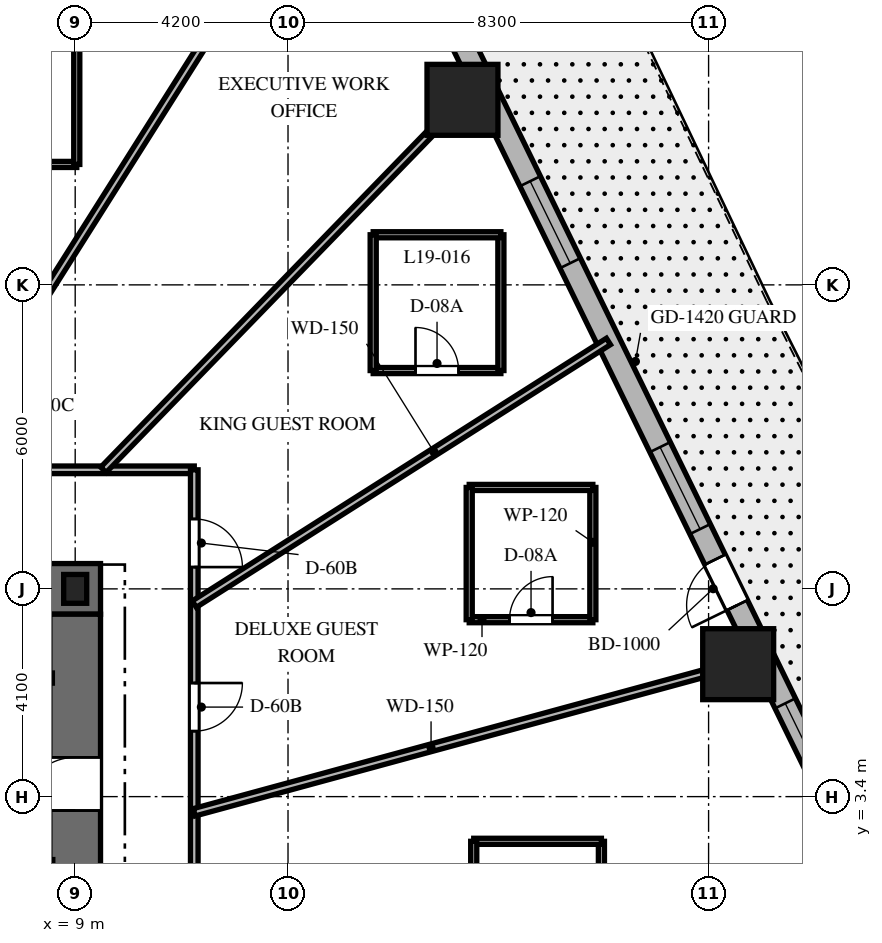
"""IFC4 building model, lengths in metres.
Left out: names, types, materials, properties, quantities, classifications, styles, units other than length and angle.
Written with IfcOpenShell. Run it as: python <this file> out.ifc"""

import sys

from ifc_helpers import new_model, si_unit, direction, frame, frame_2d, origin, origin_2d, place, context, subcontext, project, spatial, rectangle, i_section, extrude, element, fill, save


model = new_model("IFC4")
c1 = context("Model", 3, precision=1e-05, world=origin(), true_north=direction((0.0, 1.0)))
c2 = subcontext(c1, "Body", "Model", "MODEL_VIEW")
j1 = project(units=[si_unit("LENGTHUNIT", "METRE"), si_unit("PLANEANGLEUNIT", "RADIAN")], contexts=[c1])
p1 = place(None, origin())
s1 = spatial("IfcSite", under=j1, at=p1, CompositionType="ELEMENT")
p2 = place(p1, origin())
s2 = spatial("IfcBuilding", under=s1, at=p2, CompositionType="ELEMENT")
p3 = place(p2, frame((0.0, 0.0, 82.3)))
s3 = spatial("IfcBuildingStorey", under=s2, at=p3, CompositionType="ELEMENT", Elevation=82.3)
p4 = place(p3, frame((1.85, 7.5, 0.0), z_axis=(0.0, 0.0, 1.0), x_axis=(1.0, 0.0, 0.0)))
e1 = element("IfcWall", 1, at=p4, inside=s3, PredefinedType="SHEAR", context=c2, shape_type="SweptSolid", body=[
    extrude(rectangle(XDim=7.65, YDim=1.0, at=frame_2d((3.825, 0.0))), origin(), (0.0, 0.0, 1.0), 3.7),
])
p5 = place(p3, frame((9.0, -7.0, 0.0), z_axis=(0.0, 0.0, 1.0), x_axis=(0.0, 1.0, 0.0)))
e2 = element("IfcWall", 2, at=p5, inside=s3, PredefinedType="SHEAR", context=c2, shape_type="SweptSolid", body=[
    extrude(rectangle(XDim=14.0, YDim=1.0, at=frame_2d((7.0, 0.0))), origin(), (0.0, 0.0, 1.0), 3.7),
])
p6 = place(p5, frame((10.125, 0.0, 0.0)))
e3 = element("IfcOpeningElement", 3, at=p6, cuts=e2, PredefinedType="OPENING", context=c2, shape_type="SweptSolid", body=[
    extrude(rectangle(XDim=1.05, YDim=2.15, at=frame_2d((0.525, 1.075))), frame((0.0, 0.51, 0.0), z_axis=(0.0, -1.0, 0.0), x_axis=(1.0, 0.0, 0.0)), (0.0, 0.0, 1.0), 1.02),
])
p7 = place(p3, frame((8.458, -6.985, 0.0), z_axis=(0.0, 0.0, 1.0), x_axis=(0.0, 1.0, 0.0)))
e4 = element("IfcWall", 4, at=p7, inside=s3, PredefinedType="SHEAR", context=c2, shape_type="SweptSolid", body=[
    extrude(rectangle(XDim=9.143, YDim=0.2, at=frame_2d((4.572, 0.0))), origin(), (0.0, 0.0, 1.0), 3.7),
])
p8 = place(p3, frame((9.0, 7.5, 0.0), z_axis=(0.0, 0.0, 1.0), x_axis=(1.0, 0.0, 0.0)))
e5 = element("IfcColumn", 5, at=p8, inside=s3, PredefinedType="COLUMN", context=c2, shape_type="SweptSolid", body=[
    extrude(i_section(OverallWidth=0.454, OverallDepth=0.569, WebThickness=0.078, FlangeThickness=0.125, at=origin_2d()), origin(), (0.0, 0.0, 1.0), 3.7),
])
for number, where, z_axis, x_axis in (
    (6, (22.084, 6.014, 0.0), (0.0, 0.0, 1.0), (1.0, 0.0, 0.0)),
    (7, (16.643, 17.152, 0.0), (0.0, 0.0, 1.0), (1.0, 0.0, 0.0)),
):
    element("IfcColumn", number, at=place(p3, frame(where, z_axis=z_axis, x_axis=x_axis)), inside=s3, PredefinedType="COLUMN", context=c2, shape_type="SweptSolid", body=[
        extrude(rectangle(XDim=1.4, YDim=1.4, at=origin_2d()), origin(), (0.0, 0.0, 1.0), 3.7),
    ])
p9 = place(p3, frame((24.336, 2.532, 0.0), z_axis=(0.0, 0.0, 1.0), x_axis=(-0.438931326393, 0.898520612291, 0.0)))
e8 = element("IfcWall", 8, at=p9, inside=s3, PredefinedType="SOLIDWALL", context=c2, shape_type="SweptSolid", body=[
    extrude(rectangle(XDim=20.623, YDim=0.45, at=frame_2d((10.312, 0.0))), origin(), (0.0, 0.0, 1.0), 3.38),
])
p10 = place(p9, frame((5.171, 0.0, 0.0)))
e9 = element("IfcOpeningElement", 9, at=p10, cuts=e8, PredefinedType="OPENING", context=c2, shape_type="SweptSolid", body=[
    extrude(rectangle(XDim=1.0, YDim=2.15, at=frame_2d((0.5, 1.075))), frame((0.0, 0.235, 0.0), z_axis=(0.0, -1.0, 0.0), x_axis=(1.0, 0.0, 0.0)), (0.0, 0.0, 1.0), 0.47),
])
p11 = place(p9, frame((6.842, 0.0, 0.8)))
e10 = element("IfcOpeningElement", 10, at=p11, cuts=e8, PredefinedType="OPENING", context=c2, shape_type="SweptSolid", body=[
    extrude(rectangle(XDim=1.8, YDim=1.8, at=frame_2d((0.9, 0.9))), frame((0.0, 0.235, 0.0), z_axis=(0.0, -1.0, 0.0), x_axis=(1.0, 0.0, 0.0)), (0.0, 0.0, 1.0), 0.47),
])
p12 = place(p9, frame((12.683, 0.0, 0.8)))
e11 = element("IfcOpeningElement", 11, at=p12, cuts=e8, PredefinedType="OPENING", context=c2, shape_type="SweptSolid", body=[
    extrude(rectangle(XDim=1.8, YDim=1.8, at=frame_2d((0.9, 0.9))), frame((0.0, 0.235, 0.0), z_axis=(0.0, -1.0, 0.0), x_axis=(1.0, 0.0, 0.0)), (0.0, 0.0, 1.0), 0.47),
])
p13 = place(p9, frame((17.66, 0.0, 0.8)))
e12 = element("IfcOpeningElement", 12, at=p13, cuts=e8, PredefinedType="OPENING", context=c2, shape_type="SweptSolid", body=[
    extrude(rectangle(XDim=1.8, YDim=1.8, at=frame_2d((0.9, 0.9))), frame((0.0, 0.235, 0.0), z_axis=(0.0, -1.0, 0.0), x_axis=(1.0, 0.0, 0.0)), (0.0, 0.0, 1.0), 0.47),
])
p14 = place(p9, frame((1.214, 0.0, 0.8)))
e13 = element("IfcOpeningElement", 13, at=p14, cuts=e8, PredefinedType="OPENING", context=c2, shape_type="SweptSolid", body=[
    extrude(rectangle(XDim=1.8, YDim=1.8, at=frame_2d((0.9, 0.9))), frame((0.0, 0.235, 0.0), z_axis=(0.0, -1.0, 0.0), x_axis=(1.0, 0.0, 0.0)), (0.0, 0.0, 1.0), 0.47),
])
p15 = place(p3, frame((-11.35, 9.85, 0.0), z_axis=(0.0, 0.0, 1.0), x_axis=(1.0, 0.0, 0.0)))
e14 = element("IfcWall", 14, at=p15, inside=s3, PredefinedType="PARTITIONING", context=c2, shape_type="SweptSolid", body=[
    extrude(rectangle(XDim=22.7, YDim=0.15, at=frame_2d((11.35, 0.0))), origin(), (0.0, 0.0, 1.0), 2.82),
])
p16 = place(p15, frame((18.837, 0.0, 0.0)))
e15 = element("IfcOpeningElement", 15, at=p16, cuts=e14, PredefinedType="OPENING", context=c2, shape_type="SweptSolid", body=[
    extrude(rectangle(XDim=0.9, YDim=2.03, at=frame_2d((0.45, 1.015))), frame((0.0, 0.085, 0.0), z_axis=(0.0, -1.0, 0.0), x_axis=(1.0, 0.0, 0.0)), (0.0, 0.0, 1.0), 0.17),
])
p17 = place(p15, frame((15.532, 0.0, 0.0)))
e16 = element("IfcOpeningElement", 16, at=p17, cuts=e14, PredefinedType="OPENING", context=c2, shape_type="SweptSolid", body=[
    extrude(rectangle(XDim=0.95, YDim=2.03, at=frame_2d((0.475, 1.015))), frame((0.0, 0.085, 0.0), z_axis=(0.0, -1.0, 0.0), x_axis=(1.0, 0.0, 0.0)), (0.0, 0.0, 1.0), 0.17),
])
p18 = place(p15, frame((10.444, 0.0, 0.0)))
e17 = element("IfcOpeningElement", 17, at=p18, cuts=e14, PredefinedType="OPENING", context=c2, shape_type="SweptSolid", body=[
    extrude(rectangle(XDim=0.95, YDim=2.03, at=frame_2d((0.475, 1.015))), frame((0.0, 0.085, 0.0), z_axis=(0.0, -1.0, 0.0), x_axis=(1.0, 0.0, 0.0)), (0.0, 0.0, 1.0), 0.17),
])
p19 = place(p15, frame((3.369, 0.0, 0.0)))
e18 = element("IfcOpeningElement", 18, at=p19, cuts=e14, PredefinedType="OPENING", context=c2, shape_type="SweptSolid", body=[
    extrude(rectangle(XDim=0.95, YDim=2.03, at=frame_2d((0.475, 1.015))), frame((0.0, 0.085, 0.0), z_axis=(0.0, -1.0, 0.0), x_axis=(1.0, 0.0, 0.0)), (0.0, 0.0, 1.0), 0.17),
])
p20 = place(p3, frame((11.35, 9.85, 0.0), z_axis=(0.0, 0.0, 1.0), x_axis=(0.0, -1.0, 0.0)))
e19 = element("IfcWall", 19, at=p20, inside=s3, PredefinedType="PARTITIONING", context=c2, shape_type="SweptSolid", body=[
    extrude(rectangle(XDim=19.7, YDim=0.15, at=frame_2d((9.85, 0.0))), origin(), (0.0, 0.0, 1.0), 2.82),
])
p21 = place(p20, frame((4.208, 0.0, 0.0)))
e20 = element("IfcOpeningElement", 20, at=p21, cuts=e19, PredefinedType="OPENING", context=c2, shape_type="SweptSolid", body=[
    extrude(rectangle(XDim=0.95, YDim=2.03, at=frame_2d((0.475, 1.015))), frame((0.0, 0.085, 0.0), z_axis=(0.0, -1.0, 0.0), x_axis=(1.0, 0.0, 0.0)), (0.0, 0.0, 1.0), 0.17),
])
p22 = place(p20, frame((0.97, 0.0, 0.0)))
e21 = element("IfcOpeningElement", 21, at=p22, cuts=e19, PredefinedType="OPENING", context=c2, shape_type="SweptSolid", body=[
    extrude(rectangle(XDim=0.95, YDim=2.03, at=frame_2d((0.475, 1.015))), frame((0.0, 0.085, 0.0), z_axis=(0.0, -1.0, 0.0), x_axis=(1.0, 0.0, 0.0)), (0.0, 0.0, 1.0), 0.17),
])
p23 = place(p20, frame((17.181, 0.0, 0.0)))
e22 = element("IfcOpeningElement", 22, at=p23, cuts=e19, PredefinedType="OPENING", context=c2, shape_type="SweptSolid", body=[
    extrude(rectangle(XDim=0.95, YDim=2.03, at=frame_2d((0.475, 1.015))), frame((0.0, 0.085, 0.0), z_axis=(0.0, -1.0, 0.0), x_axis=(1.0, 0.0, 0.0)), (0.0, 0.0, 1.0), 0.17),
])
p24 = place(p20, frame((13.403, 0.0, 0.0)))
e23 = element("IfcOpeningElement", 23, at=p24, cuts=e19, PredefinedType="OPENING", context=c2, shape_type="SweptSolid", body=[
    extrude(rectangle(XDim=0.95, YDim=2.03, at=frame_2d((0.475, 1.015))), frame((0.0, 0.085, 0.0), z_axis=(0.0, -1.0, 0.0), x_axis=(1.0, 0.0, 0.0)), (0.0, 0.0, 1.0), 0.17),
])
p25 = place(p20, frame((8.838, 0.0, 0.0)))
e24 = element("IfcOpeningElement", 24, at=p25, cuts=e19, PredefinedType="OPENING", context=c2, shape_type="SweptSolid", body=[
    extrude(rectangle(XDim=0.95, YDim=2.03, at=frame_2d((0.475, 1.015))), frame((0.0, 0.085, 0.0), z_axis=(0.0, -1.0, 0.0), x_axis=(1.0, 0.0, 0.0)), (0.0, 0.0, 1.0), 0.17),
])
p26 = place(p3, frame((11.35, 3.091, 0.0), z_axis=(0.0, 0.0, 1.0), x_axis=(0.964859685283, 0.262765651704, 0.0)))
e25 = element("IfcWall", 25, at=p26, inside=s3, PredefinedType="PARTITIONING", context=c2, shape_type="SweptSolid", body=[
    extrude(rectangle(XDim=11.629, YDim=0.15, at=frame_2d((5.814, 0.0))), origin(), (0.0, 0.0, 1.0), 2.52),
])
p27 = place(p3, frame((11.35, 7.199, 0.0), z_axis=(0.0, 0.0, 1.0), x_axis=(0.844458213289, 0.535621439087, 0.0)))
e26 = element("IfcWall", 26, at=p27, inside=s3, PredefinedType="PARTITIONING", context=c2, shape_type="SweptSolid", body=[
    extrude(rectangle(XDim=9.679, YDim=0.15, at=frame_2d((4.84, 0.0))), origin(), (0.0, 0.0, 1.0), 2.52),
])
p28 = place(p3, frame((9.558, 9.85, 0.0), z_axis=(0.0, 0.0, 1.0), x_axis=(0.69638346089, 0.717669893056, 0.0)))
e27 = element("IfcWall", 27, at=p28, inside=s3, PredefinedType="PARTITIONING", context=c2, shape_type="SweptSolid", body=[
    extrude(rectangle(XDim=10.701, YDim=0.15, at=frame_2d((5.351, 0.0))), origin(), (0.0, 0.0, 1.0), 2.52),
])
p29 = place(p3, frame((6.222, 9.85, 0.0), z_axis=(0.0, 0.0, 1.0), x_axis=(0.534069056435, 0.845440857162, 0.0)))
e28 = element("IfcWall", 28, at=p29, inside=s3, PredefinedType="PARTITIONING", context=c2, shape_type="SweptSolid", body=[
    extrude(rectangle(XDim=14.611, YDim=0.15, at=frame_2d((7.306, 0.0))), origin(), (0.0, 0.0, 1.0), 2.52),
])
p30 = place(p3, frame((16.776, 6.892, 0.0), z_axis=(0.0, 0.0, 1.0), x_axis=(1.0, 0.0, 0.0)))
e29 = element("IfcWall", 29, at=p30, inside=s3, PredefinedType="PARTITIONING", context=c2, shape_type="SweptSolid", body=[
    extrude(rectangle(XDim=2.44, YDim=0.12, at=frame_2d((1.22, 0.0))), origin(), (0.0, 0.0, 1.0), 2.906),
])
p31 = place(p30, frame((0.795, 0.0, 0.0)))
e30 = element("IfcOpeningElement", 30, at=p31, cuts=e29, PredefinedType="OPENING", context=c2, shape_type="SweptSolid", body=[
    extrude(rectangle(XDim=0.85, YDim=2.03, at=frame_2d((0.425, 1.015))), frame((0.0, 0.07, 0.0), z_axis=(0.0, -1.0, 0.0), x_axis=(1.0, 0.0, 0.0)), (0.0, 0.0, 1.0), 0.14),
])
p32 = place(p3, frame((19.216, 6.892, 0.0), z_axis=(0.0, 0.0, 1.0), x_axis=(0.0, 1.0, 0.0)))
e31 = element("IfcWall", 31, at=p32, inside=s3, PredefinedType="PARTITIONING", context=c2, shape_type="SweptSolid", body=[
    extrude(rectangle(XDim=2.61, YDim=0.12, at=frame_2d((1.305, 0.0))), origin(), (0.0, 0.0, 1.0), 3.38),
])
p33 = place(p3, frame((19.216, 9.502, 0.0), z_axis=(0.0, 0.0, 1.0), x_axis=(-1.0, 0.0, 0.0)))
e32 = element("IfcWall", 32, at=p33, inside=s3, PredefinedType="PARTITIONING", context=c2, shape_type="SweptSolid", body=[
    extrude(rectangle(XDim=2.44, YDim=0.12, at=frame_2d((1.22, 0.0))), origin(), (0.0, 0.0, 1.0), 3.38),
])
p34 = place(p3, frame((16.776, 9.502, 0.0), z_axis=(0.0, 0.0, 1.0), x_axis=(0.0, -1.0, 0.0)))
e33 = element("IfcWall", 33, at=p34, inside=s3, PredefinedType="PARTITIONING", context=c2, shape_type="SweptSolid", body=[
    extrude(rectangle(XDim=2.61, YDim=0.12, at=frame_2d((1.305, 0.0))), origin(), (0.0, 0.0, 1.0), 2.906),
])
p35 = place(p3, frame((14.881, 11.809, 0.0), z_axis=(0.0, 0.0, 1.0), x_axis=(1.0, 0.0, 0.0)))
e34 = element("IfcWall", 34, at=p35, inside=s3, PredefinedType="PARTITIONING", context=c2, shape_type="SweptSolid", body=[
    extrude(rectangle(XDim=2.52, YDim=0.12, at=frame_2d((1.26, 0.0))), origin(), (0.0, 0.0, 1.0), 2.906),
])
p36 = place(p35, frame((0.835, 0.0, 0.0)))
e35 = element("IfcOpeningElement", 35, at=p36, cuts=e34, PredefinedType="OPENING", context=c2, shape_type="SweptSolid", body=[
    extrude(rectangle(XDim=0.85, YDim=2.03, at=frame_2d((0.425, 1.015))), frame((0.0, 0.07, 0.0), z_axis=(0.0, -1.0, 0.0), x_axis=(1.0, 0.0, 0.0)), (0.0, 0.0, 1.0), 0.14),
])
p37 = place(p3, frame((17.401, 11.809, 0.0), z_axis=(0.0, 0.0, 1.0), x_axis=(0.0, 1.0, 0.0)))
e36 = element("IfcWall", 36, at=p37, inside=s3, PredefinedType="PARTITIONING", context=c2, shape_type="SweptSolid", body=[
    extrude(rectangle(XDim=2.68, YDim=0.12, at=frame_2d((1.34, 0.0))), origin(), (0.0, 0.0, 1.0), 3.38),
])
p38 = place(p3, frame((17.401, 14.489, 0.0), z_axis=(0.0, 0.0, 1.0), x_axis=(-1.0, 0.0, 0.0)))
e37 = element("IfcWall", 37, at=p38, inside=s3, PredefinedType="PARTITIONING", context=c2, shape_type="SweptSolid", body=[
    extrude(rectangle(XDim=2.52, YDim=0.12, at=frame_2d((1.26, 0.0))), origin(), (0.0, 0.0, 1.0), 3.38),
])
p39 = place(p3, frame((14.881, 14.489, 0.0), z_axis=(0.0, 0.0, 1.0), x_axis=(0.0, -1.0, 0.0)))
e38 = element("IfcWall", 38, at=p39, inside=s3, PredefinedType="PARTITIONING", context=c2, shape_type="SweptSolid", body=[
    extrude(rectangle(XDim=2.68, YDim=0.12, at=frame_2d((1.34, 0.0))), origin(), (0.0, 0.0, 1.0), 2.906),
])
p40 = place(p3, frame((6.351, 15.877, 0.0), z_axis=(0.0, 0.0, 1.0), x_axis=(1.0, 0.0, 0.0)))
e39 = element("IfcWall", 39, at=p40, inside=s3, PredefinedType="PARTITIONING", context=c2, shape_type="SweptSolid", body=[
    extrude(rectangle(XDim=2.68, YDim=0.12, at=frame_2d((1.34, 0.0))), origin(), (0.0, 0.0, 1.0), 2.82),
])
p41 = place(p40, frame((0.915, 0.0, 0.0)))
e40 = element("IfcOpeningElement", 40, at=p41, cuts=e39, PredefinedType="OPENING", context=c2, shape_type="SweptSolid", body=[
    extrude(rectangle(XDim=0.85, YDim=2.03, at=frame_2d((0.425, 1.015))), frame((0.0, 0.07, 0.0), z_axis=(0.0, -1.0, 0.0), x_axis=(1.0, 0.0, 0.0)), (0.0, 0.0, 1.0), 0.14),
])
p42 = place(p3, frame((9.031, 15.877, 0.0), z_axis=(0.0, 0.0, 1.0), x_axis=(0.0, 1.0, 0.0)))
e41 = element("IfcWall", 41, at=p42, inside=s3, PredefinedType="PARTITIONING", context=c2, shape_type="SweptSolid", body=[
    extrude(rectangle(XDim=2.54, YDim=0.12, at=frame_2d((1.27, 0.0))), origin(), (0.0, 0.0, 1.0), 2.952),
])
p43 = place(p3, frame((19.385, -0.162, 0.0), z_axis=(0.0, 0.0, 1.0), x_axis=(0.0, 1.0, 0.0)))
e42 = element("IfcWall", 42, at=p43, inside=s3, PredefinedType="PARTITIONING", context=c2, shape_type="SweptSolid", body=[
    extrude(rectangle(XDim=2.68, YDim=0.12, at=frame_2d((1.34, 0.0))), origin(), (0.0, 0.0, 1.0), 3.38),
])
p44 = place(p3, frame((19.385, 2.518, 0.0), z_axis=(0.0, 0.0, 1.0), x_axis=(-1.0, 0.0, 0.0)))
e43 = element("IfcWall", 43, at=p44, inside=s3, PredefinedType="PARTITIONING", context=c2, shape_type="SweptSolid", body=[
    extrude(rectangle(XDim=2.52, YDim=0.12, at=frame_2d((1.26, 0.0))), origin(), (0.0, 0.0, 1.0), 2.82),
])
p45 = place(p3, frame((16.865, 2.518, 0.0), z_axis=(0.0, 0.0, 1.0), x_axis=(0.0, -1.0, 0.0)))
e44 = element("IfcWall", 44, at=p45, inside=s3, PredefinedType="PARTITIONING", context=c2, shape_type="SweptSolid", body=[
    extrude(rectangle(XDim=2.68, YDim=0.12, at=frame_2d((1.34, 0.0))), origin(), (0.0, 0.0, 1.0), 3.38),
])
p46 = place(p10, origin())
e45 = element("IfcDoor", 45, at=p46, inside=s3, OperationType="SINGLE_SWING_LEFT", PredefinedType="DOOR", context=c2, shape_type="SweptSolid", body=[
    extrude(rectangle(XDim=1.0, YDim=2.15, at=frame_2d((0.5, 1.075))), frame((0.0, 0.025, 0.0), z_axis=(0.0, -1.0, 0.0), x_axis=(1.0, 0.0, 0.0)), (0.0, 0.0, 1.0), 0.05),
])
fill(e9, e45)
p47 = place(p11, origin())
e46 = element("IfcWindow", 46, at=p47, inside=s3, PartitioningType="SINGLE_PANEL", PredefinedType="WINDOW", context=c2, shape_type="SweptSolid", body=[
    extrude(rectangle(XDim=1.8, YDim=1.8, at=frame_2d((0.9, 0.9))), frame((0.0, 0.03, 0.0), z_axis=(0.0, -1.0, 0.0), x_axis=(1.0, 0.0, 0.0)), (0.0, 0.0, 1.0), 0.06),
])
fill(e10, e46)
p48 = place(p12, origin())
e47 = element("IfcWindow", 47, at=p48, inside=s3, PartitioningType="SINGLE_PANEL", PredefinedType="WINDOW", context=c2, shape_type="SweptSolid", body=[
    extrude(rectangle(XDim=1.8, YDim=1.8, at=frame_2d((0.9, 0.9))), frame((0.0, 0.03, 0.0), z_axis=(0.0, -1.0, 0.0), x_axis=(1.0, 0.0, 0.0)), (0.0, 0.0, 1.0), 0.06),
])
fill(e11, e47)
p49 = place(p14, origin())
e48 = element("IfcWindow", 48, at=p49, inside=s3, PartitioningType="SINGLE_PANEL", PredefinedType="WINDOW", context=c2, shape_type="SweptSolid", body=[
    extrude(rectangle(XDim=1.8, YDim=1.8, at=frame_2d((0.9, 0.9))), frame((0.0, 0.03, 0.0), z_axis=(0.0, -1.0, 0.0), x_axis=(1.0, 0.0, 0.0)), (0.0, 0.0, 1.0), 0.06),
])
fill(e13, e48)
p50 = place(p6, origin())
e49 = element("IfcDoor", 49, at=p50, inside=s3, OperationType="SINGLE_SWING_LEFT", PredefinedType="DOOR", context=c2, shape_type="SweptSolid", body=[
    extrude(rectangle(XDim=1.05, YDim=2.15, at=frame_2d((0.525, 1.075))), frame((0.0, 0.025, 0.0), z_axis=(0.0, -1.0, 0.0), x_axis=(1.0, 0.0, 0.0)), (0.0, 0.0, 1.0), 0.05),
])
fill(e3, e49)
p51 = place(p21, origin())
e50 = element("IfcDoor", 50, at=p51, inside=s3, OperationType="SINGLE_SWING_LEFT", PredefinedType="DOOR", context=c2, shape_type="SweptSolid", body=[
    extrude(rectangle(XDim=0.95, YDim=2.03, at=frame_2d((0.475, 1.015))), frame((0.0, 0.025, 0.0), z_axis=(0.0, -1.0, 0.0), x_axis=(1.0, 0.0, 0.0)), (0.0, 0.0, 1.0), 0.05),
])
fill(e20, e50)
p52 = place(p31, origin())
e51 = element("IfcDoor", 51, at=p52, inside=s3, OperationType="SINGLE_SWING_RIGHT", PredefinedType="DOOR", context=c2, shape_type="SweptSolid", body=[
    extrude(rectangle(XDim=0.85, YDim=2.03, at=frame_2d((0.425, 1.015))), frame((0.0, 0.025, 0.0), z_axis=(0.0, -1.0, 0.0), x_axis=(1.0, 0.0, 0.0)), (0.0, 0.0, 1.0), 0.05),
])
fill(e30, e51)
p53 = place(p22, origin())
e52 = element("IfcDoor", 52, at=p53, inside=s3, OperationType="SINGLE_SWING_RIGHT", PredefinedType="DOOR", context=c2, shape_type="SweptSolid", body=[
    extrude(rectangle(XDim=0.95, YDim=2.03, at=frame_2d((0.475, 1.015))), frame((0.0, 0.025, 0.0), z_axis=(0.0, -1.0, 0.0), x_axis=(1.0, 0.0, 0.0)), (0.0, 0.0, 1.0), 0.05),
])
fill(e21, e52)
p54 = place(p36, origin())
e53 = element("IfcDoor", 53, at=p54, inside=s3, OperationType="SINGLE_SWING_LEFT", PredefinedType="DOOR", context=c2, shape_type="SweptSolid", body=[
    extrude(rectangle(XDim=0.85, YDim=2.03, at=frame_2d((0.425, 1.015))), frame((0.0, 0.025, 0.0), z_axis=(0.0, -1.0, 0.0), x_axis=(1.0, 0.0, 0.0)), (0.0, 0.0, 1.0), 0.05),
])
fill(e35, e53)
save(model, sys.argv[1])
